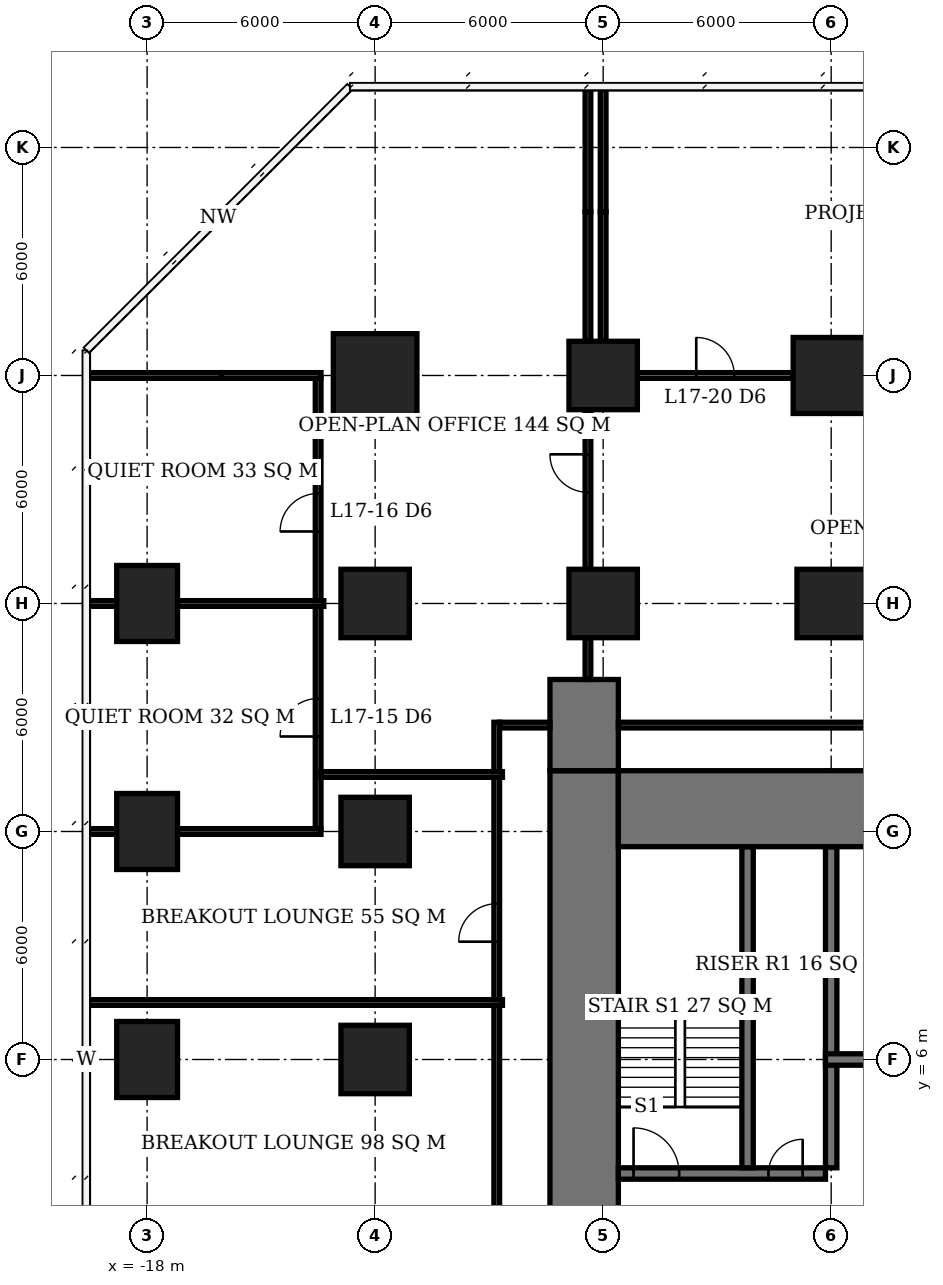
"""IFC4 building model, lengths in metres.
Left out: names, types, materials, properties, quantities, classifications, styles, units other than length and angle.
Written with IfcOpenShell. Run it as: python <this file> out.ifc"""

import sys

from ifc_helpers import new_model, si_unit, direction, frame, frame_2d, origin, origin_2d, place, context, subcontext, project, spatial, rectangle, extrude, element, fill, save


model = new_model("IFC4")
c1 = context("Model", 3, precision=1e-05, world=origin(), true_north=direction((0.0, 1.0)))
c2 = subcontext(c1, "Body", "Model", "MODEL_VIEW")
j1 = project(units=[si_unit("LENGTHUNIT", "METRE"), si_unit("PLANEANGLEUNIT", "RADIAN")], contexts=[c1])
p1 = place(None, origin())
s1 = spatial("IfcSite", under=j1, at=p1, CompositionType="ELEMENT")
p2 = place(p1, origin())
s2 = spatial("IfcBuilding", under=s1, at=p2, CompositionType="ELEMENT")
p3 = place(p2, frame((0.0, 0.0, 72.8)))
s3 = spatial("IfcBuildingStorey", under=s2, at=p3, CompositionType="ELEMENT", Elevation=72.8)
for number, where, z_axis, x_axis in (
    (1, (-18.0, 6.0, 0.0), (0.0, 0.0, 1.0), (0.0, 1.0, 0.0)),
    (2, (-18.0, 12.0, 0.0), (0.0, 0.0, 1.0), (0.0, 1.0, 0.0)),
    (3, (-18.0, 18.0, 0.0), (0.0, 0.0, 1.0), (0.0, 1.0, 0.0)),
):
    element("IfcColumn", number, at=place(p3, frame(where, z_axis=z_axis, x_axis=x_axis)), inside=s3, PredefinedType="COLUMN", context=c2, shape_type="SweptSolid", body=[
        extrude(rectangle(XDim=2.0, YDim=1.6, at=origin_2d()), origin(), (0.0, 0.0, 1.0), 3.9),
    ])
for number, where, z_axis, x_axis in (
    (4, (-12.0, 6.0, 0.0), (0.0, 0.0, 1.0), (1.0, 0.0, 0.0)),
    (5, (-12.0, 12.0, 0.0), (0.0, 0.0, 1.0), (1.0, 0.0, 0.0)),
    (6, (-12.0, 18.0, 0.0), (0.0, 0.0, 1.0), (1.0, 0.0, 0.0)),
):
    element("IfcColumn", number, at=place(p3, frame(where, z_axis=z_axis, x_axis=x_axis)), inside=s3, PredefinedType="COLUMN", context=c2, shape_type="SweptSolid", body=[
        extrude(rectangle(XDim=1.8, YDim=1.8, at=origin_2d()), origin(), (0.0, 0.0, 1.0), 3.9),
    ])
p4 = place(p3, frame((-12.0, 24.0, 0.0), z_axis=(0.0, 0.0, 1.0), x_axis=(1.0, 0.0, 0.0)))
e7 = element("IfcColumn", 7, at=p4, inside=s3, PredefinedType="COLUMN", context=c2, shape_type="SweptSolid", body=[
    extrude(rectangle(XDim=2.2, YDim=2.2, at=origin_2d()), origin(), (0.0, 0.0, 1.0), 3.9),
])
for number, where, z_axis, x_axis in (
    (8, (-6.0, 18.0, 0.0), (0.0, 0.0, 1.0), (1.0, 0.0, 0.0)),
    (9, (-6.0, 24.0, 0.0), (0.0, 0.0, 1.0), (1.0, 0.0, 0.0)),
    (10, (0.0, 18.0, 0.0), (0.0, 0.0, 1.0), (1.0, 0.0, 0.0)),
):
    element("IfcColumn", number, at=place(p3, frame(where, z_axis=z_axis, x_axis=x_axis)), inside=s3, PredefinedType="COLUMN", context=c2, shape_type="SweptSolid", body=[
        extrude(rectangle(XDim=1.8, YDim=1.8, at=origin_2d()), origin(), (0.0, 0.0, 1.0), 3.9),
    ])
p5 = place(p3, frame((0.0, 24.0, 0.0), z_axis=(0.0, 0.0, 1.0), x_axis=(1.0, 0.0, 0.0)))
e11 = element("IfcColumn", 11, at=p5, inside=s3, PredefinedType="COLUMN", context=c2, shape_type="SweptSolid", body=[
    extrude(rectangle(XDim=2.0, YDim=2.0, at=origin_2d()), origin(), (0.0, 0.0, 1.0), 3.9),
])
p6 = place(p3, frame((-5.6, 12.6, 0.0), z_axis=(0.0, 0.0, 1.0), x_axis=(1.0, 0.0, 0.0)))
e12 = element("IfcWall", 12, at=p6, inside=s3, PredefinedType="SHEAR", context=c2, shape_type="SweptSolid", body=[
    extrude(rectangle(XDim=23.2, YDim=2.0, at=frame_2d((11.6, 0.0))), origin(), (0.0, 0.0, 1.0), 3.9),
])
p7 = place(p3, frame((-6.5, -7.6, 0.0), z_axis=(0.0, 0.0, 1.0), x_axis=(0.0, 1.0, 0.0)))
e13 = element("IfcWall", 13, at=p7, inside=s3, PredefinedType="SHEAR", context=c2, shape_type="SweptSolid", body=[
    extrude(rectangle(XDim=21.2, YDim=1.8, at=frame_2d((10.6, 0.0))), origin(), (0.0, 0.0, 1.0), 3.9),
])
p8 = place(p7, frame((7.8, 0.0, 0.0)))
e14 = element("IfcOpeningElement", 14, at=p8, cuts=e13, PredefinedType="OPENING", context=c2, shape_type="SweptSolid", body=[
    extrude(rectangle(XDim=1.8, YDim=2.4, at=frame_2d((0.9, 1.2))), frame((0.0, 0.91, 0.0), z_axis=(0.0, -1.0, 0.0), x_axis=(1.0, 0.0, 0.0)), (0.0, 0.0, 1.0), 1.82),
])
p9 = place(p3, frame((-6.5, 13.6, 0.0), z_axis=(0.0, 0.0, 1.0), x_axis=(0.0, 1.0, 0.0)))
e15 = element("IfcWall", 15, at=p9, inside=s3, PredefinedType="SHEAR", context=c2, shape_type="SweptSolid", body=[
    extrude(rectangle(XDim=2.4, YDim=1.8, at=frame_2d((1.2, 0.0))), origin(), (0.0, 0.0, 1.0), 3.9),
])
p10 = place(p3, frame((-5.6, 3.0, 0.0), z_axis=(0.0, 0.0, 1.0), x_axis=(1.0, 0.0, 0.0)))
e16 = element("IfcWall", 16, at=p10, inside=s3, PredefinedType="SHEAR", context=c2, shape_type="SweptSolid", body=[
    extrude(rectangle(XDim=5.45, YDim=0.3, at=frame_2d((2.725, 0.0))), origin(), (0.0, 0.0, 1.0), 3.9),
])
p11 = place(p10, frame((0.4, 0.0, 0.0)))
e17 = element("IfcOpeningElement", 17, at=p11, cuts=e16, PredefinedType="OPENING", context=c2, shape_type="SweptSolid", body=[
    extrude(rectangle(XDim=1.2, YDim=2.1, at=frame_2d((0.6, 1.05))), frame((0.0, 0.16, 0.0), z_axis=(0.0, -1.0, 0.0), x_axis=(1.0, 0.0, 0.0)), (0.0, 0.0, 1.0), 0.32),
])
p12 = place(p10, frame((3.95, 0.0, 0.0)))
e18 = element("IfcOpeningElement", 18, at=p12, cuts=e16, PredefinedType="OPENING", context=c2, shape_type="SweptSolid", body=[
    extrude(rectangle(XDim=0.9, YDim=2.1, at=frame_2d((0.45, 1.05))), frame((0.0, 0.16, 0.0), z_axis=(0.0, -1.0, 0.0), x_axis=(1.0, 0.0, 0.0)), (0.0, 0.0, 1.0), 0.32),
])
p13 = place(p3, frame((-0.15, 6.0, 0.0), z_axis=(0.0, 0.0, 1.0), x_axis=(1.0, 0.0, 0.0)))
e19 = element("IfcWall", 19, at=p13, inside=s3, PredefinedType="SHEAR", context=c2, shape_type="SweptSolid", body=[
    extrude(rectangle(XDim=17.75, YDim=0.3, at=frame_2d((8.875, 0.0))), origin(), (0.0, 0.0, 1.0), 3.9),
])
p14 = place(p13, frame((13.15, 0.0, 0.0)))
e20 = element("IfcOpeningElement", 20, at=p14, cuts=e19, PredefinedType="OPENING", context=c2, shape_type="SweptSolid", body=[
    extrude(rectangle(XDim=0.9, YDim=2.1, at=frame_2d((0.45, 1.05))), frame((0.0, 0.16, 0.0), z_axis=(0.0, -1.0, 0.0), x_axis=(1.0, 0.0, 0.0)), (0.0, 0.0, 1.0), 0.32),
])
p15 = place(p13, frame((16.25, 0.0, 0.0)))
e21 = element("IfcOpeningElement", 21, at=p15, cuts=e19, PredefinedType="OPENING", context=c2, shape_type="SweptSolid", body=[
    extrude(rectangle(XDim=1.0, YDim=2.1, at=frame_2d((0.5, 1.05))), frame((0.0, 0.16, 0.0), z_axis=(0.0, -1.0, 0.0), x_axis=(1.0, 0.0, 0.0)), (0.0, 0.0, 1.0), 0.32),
])
p16 = place(p13, frame((1.1, 0.0, 0.0)))
e22 = element("IfcOpeningElement", 22, at=p16, cuts=e19, PredefinedType="OPENING", context=c2, shape_type="SweptSolid", body=[
    extrude(rectangle(XDim=1.1, YDim=2.1, at=frame_2d((0.55, 1.05))), frame((0.0, 0.16, 0.0), z_axis=(0.0, -1.0, 0.0), x_axis=(1.0, 0.0, 0.0)), (0.0, 0.0, 1.0), 0.32),
])
p17 = place(p13, frame((4.1, 0.0, 0.0)))
e23 = element("IfcOpeningElement", 23, at=p17, cuts=e19, PredefinedType="OPENING", context=c2, shape_type="SweptSolid", body=[
    extrude(rectangle(XDim=1.1, YDim=2.1, at=frame_2d((0.55, 1.05))), frame((0.0, 0.16, 0.0), z_axis=(0.0, -1.0, 0.0), x_axis=(1.0, 0.0, 0.0)), (0.0, 0.0, 1.0), 0.32),
])
p18 = place(p13, frame((7.1, 0.0, 0.0)))
e24 = element("IfcOpeningElement", 24, at=p18, cuts=e19, PredefinedType="OPENING", context=c2, shape_type="SweptSolid", body=[
    extrude(rectangle(XDim=1.1, YDim=2.1, at=frame_2d((0.55, 1.05))), frame((0.0, 0.16, 0.0), z_axis=(0.0, -1.0, 0.0), x_axis=(1.0, 0.0, 0.0)), (0.0, 0.0, 1.0), 0.32),
])
p19 = place(p13, frame((10.1, 0.0, 0.0)))
e25 = element("IfcOpeningElement", 25, at=p19, cuts=e19, PredefinedType="OPENING", context=c2, shape_type="SweptSolid", body=[
    extrude(rectangle(XDim=1.1, YDim=2.1, at=frame_2d((0.55, 1.05))), frame((0.0, 0.16, 0.0), z_axis=(0.0, -1.0, 0.0), x_axis=(1.0, 0.0, 0.0)), (0.0, 0.0, 1.0), 0.32),
])
for number, where, z_axis, x_axis in (
    (26, (0.0, 3.15, 0.0), (0.0, 0.0, 1.0), (0.0, 1.0, 0.0)),
    (27, (-2.2, 3.15, 0.0), (0.0, 0.0, 1.0), (0.0, 1.0, 0.0)),
):
    element("IfcWall", number, at=place(p3, frame(where, z_axis=z_axis, x_axis=x_axis)), inside=s3, PredefinedType="SHEAR", context=c2, shape_type="SweptSolid", body=[
        extrude(rectangle(XDim=8.45, YDim=0.3, at=frame_2d((4.225, 0.0))), origin(), (0.0, 0.0, 1.0), 3.9),
    ])
p20 = place(p3, frame((-19.6, 12.0, 0.0), z_axis=(0.0, 0.0, 1.0), x_axis=(1.0, 0.0, 0.0)))
e28 = element("IfcWall", 28, at=p20, inside=s3, PredefinedType="PARTITIONING", context=c2, shape_type="SweptSolid", body=[
    extrude(rectangle(XDim=0.8, YDim=0.15, at=frame_2d((0.4, 0.0))), origin(), (0.0, 0.0, 1.0), 3.65),
])
p21 = place(p3, frame((-17.2, 12.0, 0.0), z_axis=(0.0, 0.0, 1.0), x_axis=(1.0, 0.0, 0.0)))
e29 = element("IfcWall", 29, at=p21, inside=s3, PredefinedType="PARTITIONING", context=c2, shape_type="SweptSolid", body=[
    extrude(rectangle(XDim=3.775, YDim=0.15, at=frame_2d((1.887, 0.0))), origin(), (0.0, 0.0, 1.0), 3.65),
])
p22 = place(p3, frame((-19.6, 18.0, 0.0), z_axis=(0.0, 0.0, 1.0), x_axis=(1.0, 0.0, 0.0)))
e30 = element("IfcWall", 30, at=p22, inside=s3, PredefinedType="PARTITIONING", context=c2, shape_type="SweptSolid", body=[
    extrude(rectangle(XDim=0.8, YDim=0.15, at=frame_2d((0.4, 0.0))), origin(), (0.0, 0.0, 1.0), 3.65),
])
p23 = place(p3, frame((-17.2, 18.0, 0.0), z_axis=(0.0, 0.0, 1.0), x_axis=(1.0, 0.0, 0.0)))
e31 = element("IfcWall", 31, at=p23, inside=s3, PredefinedType="PARTITIONING", context=c2, shape_type="SweptSolid", body=[
    extrude(rectangle(XDim=3.85, YDim=0.15, at=frame_2d((1.925, 0.0))), origin(), (0.0, 0.0, 1.0), 3.65),
])
p24 = place(p3, frame((-19.6, 24.0, 0.0), z_axis=(0.0, 0.0, 1.0), x_axis=(1.0, 0.0, 0.0)))
e32 = element("IfcWall", 32, at=p24, inside=s3, PredefinedType="PARTITIONING", context=c2, shape_type="SweptSolid", body=[
    extrude(rectangle(XDim=3.555, YDim=0.15, at=frame_2d((1.778, 0.0))), origin(), (0.0, 0.0, 1.0), 3.65),
])
p25 = place(p3, frame((-16.045, 24.0, 0.0), z_axis=(0.0, 0.0, 1.0), x_axis=(1.0, 0.0, 0.0)))
e33 = element("IfcWall", 33, at=p25, inside=s3, PredefinedType="PARTITIONING", context=c2, shape_type="SweptSolid", body=[
    extrude(rectangle(XDim=2.62, YDim=0.15, at=frame_2d((1.31, 0.0))), origin(), (0.0, 0.0, 1.0), 2.65),
])
p26 = place(p3, frame((-5.1, 24.0, 0.0), z_axis=(0.0, 0.0, 1.0), x_axis=(1.0, 0.0, 0.0)))
e34 = element("IfcWall", 34, at=p26, inside=s3, PredefinedType="PARTITIONING", context=c2, shape_type="SweptSolid", body=[
    extrude(rectangle(XDim=4.1, YDim=0.15, at=frame_2d((2.05, 0.0))), origin(), (0.0, 0.0, 1.0), 3.65),
])
p27 = place(p26, frame((1.55, 0.0, 0.0)))
e35 = element("IfcOpeningElement", 35, at=p27, cuts=e34, PredefinedType="OPENING", context=c2, shape_type="SweptSolid", body=[
    extrude(rectangle(XDim=1.0, YDim=2.1, at=frame_2d((0.5, 1.05))), frame((0.0, 0.085, 0.0), z_axis=(0.0, -1.0, 0.0), x_axis=(1.0, 0.0, 0.0)), (0.0, 0.0, 1.0), 0.17),
])
p28 = place(p3, frame((-13.5, 12.075, 0.0), z_axis=(0.0, 0.0, 1.0), x_axis=(0.0, 1.0, 0.0)))
e36 = element("IfcWall", 36, at=p28, inside=s3, PredefinedType="PARTITIONING", context=c2, shape_type="SweptSolid", body=[
    extrude(rectangle(XDim=5.85, YDim=0.15, at=frame_2d((2.925, 0.0))), origin(), (0.0, 0.0, 1.0), 3.65),
])
p29 = place(p28, frame((2.425, 0.0, 0.0)))
e37 = element("IfcOpeningElement", 37, at=p29, cuts=e36, PredefinedType="OPENING", context=c2, shape_type="SweptSolid", body=[
    extrude(rectangle(XDim=1.0, YDim=2.1, at=frame_2d((0.5, 1.05))), frame((0.0, 0.085, 0.0), z_axis=(0.0, -1.0, 0.0), x_axis=(1.0, 0.0, 0.0)), (0.0, 0.0, 1.0), 0.17),
])
p30 = place(p3, frame((-13.5, 18.075, 0.0), z_axis=(0.0, 0.0, 1.0), x_axis=(0.0, 1.0, 0.0)))
e38 = element("IfcWall", 38, at=p30, inside=s3, PredefinedType="PARTITIONING", context=c2, shape_type="SweptSolid", body=[
    extrude(rectangle(XDim=4.715, YDim=0.15, at=frame_2d((2.357, 0.0))), origin(), (0.0, 0.0, 1.0), 3.65),
])
p31 = place(p30, frame((1.82, 0.0, 0.0)))
e39 = element("IfcOpeningElement", 39, at=p31, cuts=e38, PredefinedType="OPENING", context=c2, shape_type="SweptSolid", body=[
    extrude(rectangle(XDim=1.0, YDim=2.1, at=frame_2d((0.5, 1.05))), frame((0.0, 0.085, 0.0), z_axis=(0.0, -1.0, 0.0), x_axis=(1.0, 0.0, 0.0)), (0.0, 0.0, 1.0), 0.17),
])
p32 = place(p3, frame((-13.5, 22.79, 0.0), z_axis=(0.0, 0.0, 1.0), x_axis=(0.0, 1.0, 0.0)))
e40 = element("IfcWall", 40, at=p32, inside=s3, PredefinedType="PARTITIONING", context=c2, shape_type="SweptSolid", body=[
    extrude(rectangle(XDim=1.135, YDim=0.15, at=frame_2d((0.567, 0.0))), origin(), (0.0, 0.0, 1.0), 2.65),
])
p33 = place(p3, frame((-6.0, 24.9, 0.0), z_axis=(0.0, 0.0, 1.0), x_axis=(0.0, 1.0, 0.0)))
e41 = element("IfcWall", 41, at=p33, inside=s3, PredefinedType="PARTITIONING", context=c2, shape_type="SweptSolid", body=[
    extrude(rectangle(XDim=3.41, YDim=0.15, at=frame_2d((1.705, 0.0))), origin(), (0.0, 0.0, 1.0), 2.65),
])
p34 = place(p3, frame((-6.0, 28.31, 0.0), z_axis=(0.0, 0.0, 1.0), x_axis=(0.0, 1.0, 0.0)))
e42 = element("IfcWall", 42, at=p34, inside=s3, PredefinedType="PARTITIONING", context=c2, shape_type="SweptSolid", body=[
    extrude(rectangle(XDim=3.29, YDim=0.15, at=frame_2d((1.645, 0.0))), origin(), (0.0, 0.0, 1.0), 3.65),
])
p35 = place(p3, frame((-19.6, 7.5, 0.0), z_axis=(0.0, 0.0, 1.0), x_axis=(1.0, 0.0, 0.0)))
e43 = element("IfcWall", 43, at=p35, inside=s3, PredefinedType="PARTITIONING", context=c2, shape_type="SweptSolid", body=[
    extrude(rectangle(XDim=10.95, YDim=0.15, at=frame_2d((5.475, 0.0))), origin(), (0.0, 0.0, 1.0), 3.65),
])
p36 = place(p3, frame((-13.425, 13.5, 0.0), z_axis=(0.0, 0.0, 1.0), x_axis=(1.0, 0.0, 0.0)))
e44 = element("IfcWall", 44, at=p36, inside=s3, PredefinedType="PARTITIONING", context=c2, shape_type="SweptSolid", body=[
    extrude(rectangle(XDim=4.775, YDim=0.15, at=frame_2d((2.388, 0.0))), origin(), (0.0, 0.0, 1.0), 3.65),
])
p37 = place(p3, frame((-8.8, -4.425, 0.0), z_axis=(0.0, 0.0, 1.0), x_axis=(0.0, 1.0, 0.0)))
e45 = element("IfcWall", 45, at=p37, inside=s3, PredefinedType="PARTITIONING", context=c2, shape_type="SweptSolid", body=[
    extrude(rectangle(XDim=11.85, YDim=0.15, at=frame_2d((5.925, 0.0))), origin(), (0.0, 0.0, 1.0), 3.65),
])
p38 = place(p37, frame((3.625, 0.0, 0.0)))
e46 = element("IfcOpeningElement", 46, at=p38, cuts=e45, PredefinedType="OPENING", context=c2, shape_type="SweptSolid", body=[
    extrude(rectangle(XDim=1.0, YDim=2.1, at=frame_2d((0.5, 1.05))), frame((0.0, 0.085, 0.0), z_axis=(0.0, -1.0, 0.0), x_axis=(1.0, 0.0, 0.0)), (0.0, 0.0, 1.0), 0.17),
])
p39 = place(p3, frame((-8.8, 7.575, 0.0), z_axis=(0.0, 0.0, 1.0), x_axis=(0.0, 1.0, 0.0)))
e47 = element("IfcWall", 47, at=p39, inside=s3, PredefinedType="PARTITIONING", context=c2, shape_type="SweptSolid", body=[
    extrude(rectangle(XDim=5.85, YDim=0.15, at=frame_2d((2.925, 0.0))), origin(), (0.0, 0.0, 1.0), 3.65),
])
p40 = place(p39, frame((1.525, 0.0, 0.0)))
e48 = element("IfcOpeningElement", 48, at=p40, cuts=e47, PredefinedType="OPENING", context=c2, shape_type="SweptSolid", body=[
    extrude(rectangle(XDim=1.0, YDim=2.1, at=frame_2d((0.5, 1.05))), frame((0.0, 0.085, 0.0), z_axis=(0.0, -1.0, 0.0), x_axis=(1.0, 0.0, 0.0)), (0.0, 0.0, 1.0), 0.17),
])
p41 = place(p3, frame((-8.8, 13.575, 0.0), z_axis=(0.0, 0.0, 1.0), x_axis=(0.0, 1.0, 0.0)))
e49 = element("IfcWall", 49, at=p41, inside=s3, PredefinedType="PARTITIONING", context=c2, shape_type="SweptSolid", body=[
    extrude(rectangle(XDim=1.3, YDim=0.15, at=frame_2d((0.65, 0.0))), origin(), (0.0, 0.0, 1.0), 3.65),
])
p42 = place(p3, frame((-8.725, 14.8, 0.0), z_axis=(0.0, 0.0, 1.0), x_axis=(1.0, 0.0, 0.0)))
e50 = element("IfcWall", 50, at=p42, inside=s3, PredefinedType="PARTITIONING", context=c2, shape_type="SweptSolid", body=[
    extrude(rectangle(XDim=1.325, YDim=0.15, at=frame_2d((0.663, 0.0))), origin(), (0.0, 0.0, 1.0), 3.65),
])
p43 = place(p3, frame((-6.4, 16.0, 0.0), z_axis=(0.0, 0.0, 1.0), x_axis=(0.0, 1.0, 0.0)))
e51 = element("IfcWall", 51, at=p43, inside=s3, PredefinedType="PARTITIONING", context=c2, shape_type="SweptSolid", body=[
    extrude(rectangle(XDim=1.1, YDim=0.15, at=frame_2d((0.55, 0.0))), origin(), (0.0, 0.0, 1.0), 3.65),
])
p44 = place(p3, frame((-6.4, 18.9, 0.0), z_axis=(0.0, 0.0, 1.0), x_axis=(0.0, 1.0, 0.0)))
e52 = element("IfcWall", 52, at=p44, inside=s3, PredefinedType="PARTITIONING", context=c2, shape_type="SweptSolid", body=[
    extrude(rectangle(XDim=4.2, YDim=0.15, at=frame_2d((2.1, 0.0))), origin(), (0.0, 0.0, 1.0), 3.65),
])
p45 = place(p44, frame((2.025, 0.0, 0.0)))
e53 = element("IfcOpeningElement", 53, at=p45, cuts=e52, PredefinedType="OPENING", context=c2, shape_type="SweptSolid", body=[
    extrude(rectangle(XDim=1.0, YDim=2.1, at=frame_2d((0.5, 1.05))), frame((0.0, 0.085, 0.0), z_axis=(0.0, -1.0, 0.0), x_axis=(1.0, 0.0, 0.0)), (0.0, 0.0, 1.0), 0.17),
])
p46 = place(p3, frame((-6.4, 24.9, 0.0), z_axis=(0.0, 0.0, 1.0), x_axis=(0.0, 1.0, 0.0)))
e54 = element("IfcWall", 54, at=p46, inside=s3, PredefinedType="PARTITIONING", context=c2, shape_type="SweptSolid", body=[
    extrude(rectangle(XDim=3.41, YDim=0.15, at=frame_2d((1.705, 0.0))), origin(), (0.0, 0.0, 1.0), 2.65),
])
p47 = place(p3, frame((-6.4, 28.31, 0.0), z_axis=(0.0, 0.0, 1.0), x_axis=(0.0, 1.0, 0.0)))
e55 = element("IfcWall", 55, at=p47, inside=s3, PredefinedType="PARTITIONING", context=c2, shape_type="SweptSolid", body=[
    extrude(rectangle(XDim=3.24, YDim=0.15, at=frame_2d((1.62, 0.0))), origin(), (0.0, 0.0, 1.0), 3.65),
])
p48 = place(p3, frame((-5.6, 14.8, 0.0), z_axis=(0.0, 0.0, 1.0), x_axis=(1.0, 0.0, 0.0)))
e56 = element("IfcWall", 56, at=p48, inside=s3, PredefinedType="PARTITIONING", context=c2, shape_type="SweptSolid", body=[
    extrude(rectangle(XDim=19.025, YDim=0.15, at=frame_2d((9.513, 0.0))), origin(), (0.0, 0.0, 1.0), 3.65),
])
p49 = place(p48, frame((11.915, 0.0, 0.0)))
e57 = element("IfcOpeningElement", 57, at=p49, cuts=e56, PredefinedType="OPENING", context=c2, shape_type="SweptSolid", body=[
    extrude(rectangle(XDim=1.0, YDim=2.1, at=frame_2d((0.5, 1.05))), frame((0.0, 0.085, 0.0), z_axis=(0.0, -1.0, 0.0), x_axis=(1.0, 0.0, 0.0)), (0.0, 0.0, 1.0), 0.17),
])
p50 = place(p11, origin())
e58 = element("IfcDoor", 58, at=p50, inside=s3, OperationType="SINGLE_SWING_LEFT", PredefinedType="DOOR", context=c2, shape_type="SweptSolid", body=[
    extrude(rectangle(XDim=1.2, YDim=2.1, at=frame_2d((0.6, 1.05))), frame((0.0, 0.025, 0.0), z_axis=(0.0, -1.0, 0.0), x_axis=(1.0, 0.0, 0.0)), (0.0, 0.0, 1.0), 0.05),
])
fill(e17, e58)
p51 = place(p12, origin())
e59 = element("IfcDoor", 59, at=p51, inside=s3, OperationType="SINGLE_SWING_RIGHT", PredefinedType="DOOR", context=c2, shape_type="SweptSolid", body=[
    extrude(rectangle(XDim=0.9, YDim=2.1, at=frame_2d((0.45, 1.05))), frame((0.0, 0.025, 0.0), z_axis=(0.0, -1.0, 0.0), x_axis=(1.0, 0.0, 0.0)), (0.0, 0.0, 1.0), 0.05),
])
fill(e18, e59)
p52 = place(p29, origin())
e60 = element("IfcDoor", 60, at=p52, inside=s3, OperationType="SINGLE_SWING_LEFT", PredefinedType="DOOR", context=c2, shape_type="SweptSolid", body=[
    extrude(rectangle(XDim=1.0, YDim=2.1, at=frame_2d((0.5, 1.05))), frame((0.0, 0.025, 0.0), z_axis=(0.0, -1.0, 0.0), x_axis=(1.0, 0.0, 0.0)), (0.0, 0.0, 1.0), 0.05),
])
fill(e37, e60)
p53 = place(p31, origin())
e61 = element("IfcDoor", 61, at=p53, inside=s3, OperationType="SINGLE_SWING_LEFT", PredefinedType="DOOR", context=c2, shape_type="SweptSolid", body=[
    extrude(rectangle(XDim=1.0, YDim=2.1, at=frame_2d((0.5, 1.05))), frame((0.0, 0.025, 0.0), z_axis=(0.0, -1.0, 0.0), x_axis=(1.0, 0.0, 0.0)), (0.0, 0.0, 1.0), 0.05),
])
fill(e39, e61)
p54 = place(p27, origin())
e62 = element("IfcDoor", 62, at=p54, inside=s3, OperationType="SINGLE_SWING_LEFT", PredefinedType="DOOR", context=c2, shape_type="SweptSolid", body=[
    extrude(rectangle(XDim=1.0, YDim=2.1, at=frame_2d((0.5, 1.05))), frame((0.0, 0.025, 0.0), z_axis=(0.0, -1.0, 0.0), x_axis=(1.0, 0.0, 0.0)), (0.0, 0.0, 1.0), 0.05),
])
fill(e35, e62)
p55 = place(p40, origin())
e63 = element("IfcDoor", 63, at=p55, inside=s3, OperationType="SINGLE_SWING_LEFT", PredefinedType="DOOR", context=c2, shape_type="SweptSolid", body=[
    extrude(rectangle(XDim=1.0, YDim=2.1, at=frame_2d((0.5, 1.05))), frame((0.0, 0.025, 0.0), z_axis=(0.0, -1.0, 0.0), x_axis=(1.0, 0.0, 0.0)), (0.0, 0.0, 1.0), 0.05),
])
fill(e48, e63)
p56 = place(p45, origin())
e64 = element("IfcDoor", 64, at=p56, inside=s3, OperationType="SINGLE_SWING_RIGHT", PredefinedType="DOOR", context=c2, shape_type="SweptSolid", body=[
    extrude(rectangle(XDim=1.0, YDim=2.1, at=frame_2d((0.5, 1.05))), frame((0.0, 0.025, 0.0), z_axis=(0.0, -1.0, 0.0), x_axis=(1.0, 0.0, 0.0)), (0.0, 0.0, 1.0), 0.05),
])
fill(e53, e64)
save(model, sys.argv[1])
